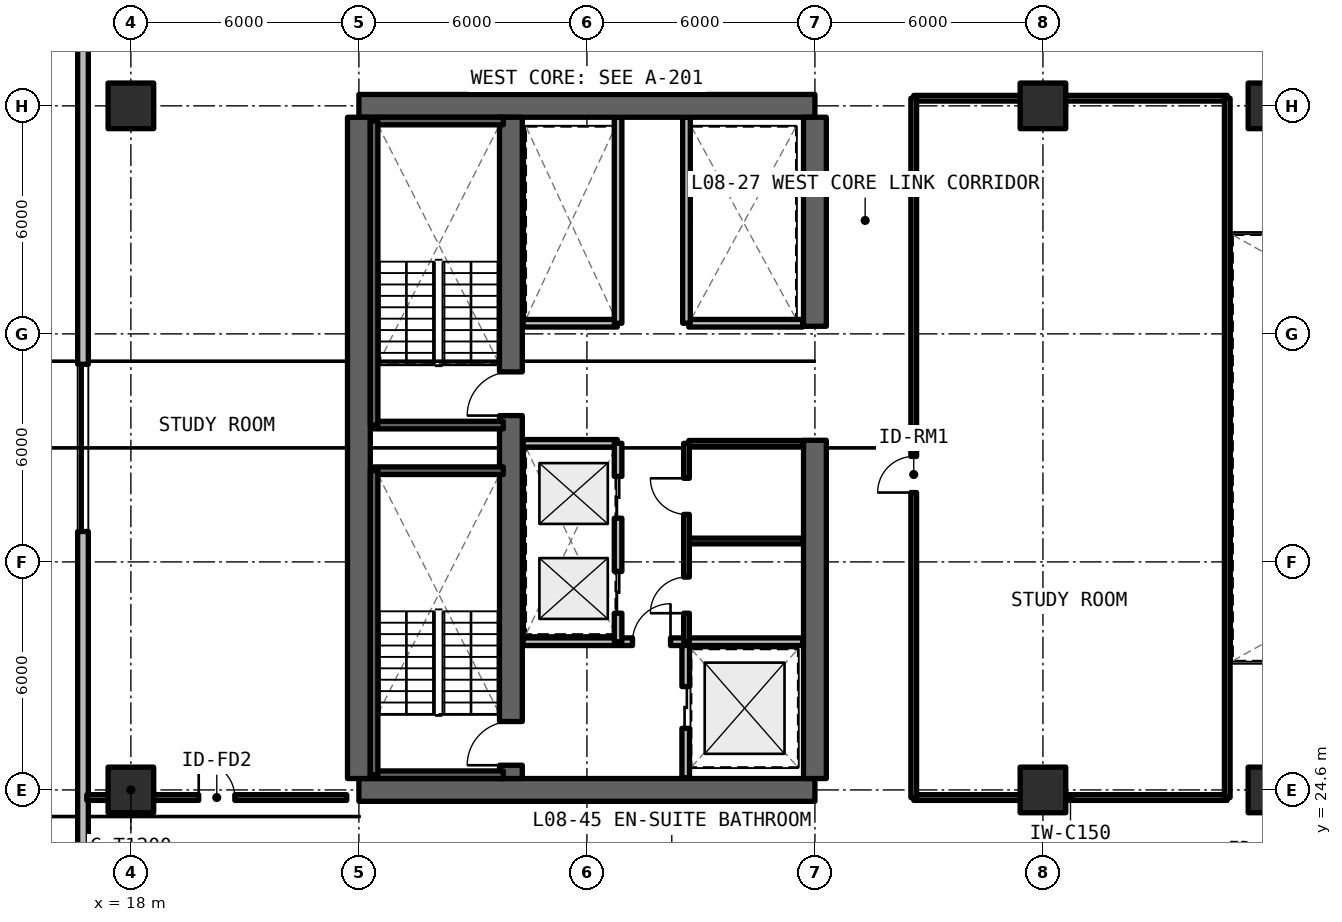
"""IFC4 building model, lengths in metres.
Left out: names, types, materials, properties, quantities, classifications, styles, units other than length and angle.
Written with IfcOpenShell. Run it as: python <this file> out.ifc"""

import sys

from ifc_helpers import new_model, si_unit, direction, frame, frame_2d, origin, origin_2d, place, context, subcontext, project, spatial, rectangle, extrude, element, fill, save


model = new_model("IFC4")
c1 = context("Model", 3, precision=1e-05, world=origin(), true_north=direction((0.0, 1.0)))
c2 = subcontext(c1, "Body", "Model", "MODEL_VIEW")
j1 = project(units=[si_unit("LENGTHUNIT", "METRE"), si_unit("PLANEANGLEUNIT", "RADIAN")], contexts=[c1])
p1 = place(None, origin())
s1 = spatial("IfcSite", under=j1, at=p1, CompositionType="ELEMENT")
p2 = place(p1, origin())
s2 = spatial("IfcBuilding", under=s1, at=p2, CompositionType="ELEMENT")
p3 = place(p2, frame((0.0, 0.0, 32.34)))
s3 = spatial("IfcBuildingStorey", under=s2, at=p3, CompositionType="ELEMENT", Elevation=32.34)
for number, where, z_axis, x_axis in (
    (1, (24.0, 24.6, 0.0), (0.0, 0.0, 1.0), (1.0, 0.0, 0.0)),
    (2, (36.0, 42.6, 0.0), (0.0, 0.0, 1.0), (-1.0, 0.0, 0.0)),
):
    element("IfcWall", number, at=place(p3, frame(where, z_axis=z_axis, x_axis=x_axis)), inside=s3, PredefinedType="SHEAR", context=c2, shape_type="SweptSolid", body=[
        extrude(rectangle(XDim=12.0, YDim=0.6, at=frame_2d((6.0, 0.0))), origin(), (0.0, 0.0, 1.0), 3.3),
    ])
p4 = place(p3, frame((24.0, 24.9, 0.0), z_axis=(0.0, 0.0, 1.0), x_axis=(0.0, 1.0, 0.0)))
e3 = element("IfcWall", 3, at=p4, inside=s3, PredefinedType="SHEAR", context=c2, shape_type="SweptSolid", body=[
    extrude(rectangle(XDim=17.4, YDim=0.6, at=frame_2d((8.7, 0.0))), origin(), (0.0, 0.0, 1.0), 3.3),
])
p5 = place(p3, frame((36.0, 24.9, 0.0), z_axis=(0.0, 0.0, 1.0), x_axis=(0.0, 1.0, 0.0)))
e4 = element("IfcWall", 4, at=p5, inside=s3, PredefinedType="SHEAR", context=c2, shape_type="SweptSolid", body=[
    extrude(rectangle(XDim=8.9, YDim=0.6, at=frame_2d((4.45, 0.0))), origin(), (0.0, 0.0, 1.0), 3.3),
])
p6 = place(p3, frame((36.0, 36.8, 0.0), z_axis=(0.0, 0.0, 1.0), x_axis=(0.0, 1.0, 0.0)))
e5 = element("IfcWall", 5, at=p6, inside=s3, PredefinedType="SHEAR", context=c2, shape_type="SweptSolid", body=[
    extrude(rectangle(XDim=5.5, YDim=0.6, at=frame_2d((2.75, 0.0))), origin(), (0.0, 0.0, 1.0), 3.3),
])
p7 = place(p3, frame((28.0, 24.9, 0.0), z_axis=(0.0, 0.0, 1.0), x_axis=(0.0, 1.0, 0.0)))
e6 = element("IfcWall", 6, at=p7, inside=s3, PredefinedType="SHEAR", context=c2, shape_type="SweptSolid", body=[
    extrude(rectangle(XDim=17.4, YDim=0.6, at=frame_2d((8.7, 0.0))), origin(), (0.0, 0.0, 1.0), 3.3),
])
p8 = place(p7, frame((0.35, 0.0, 0.0)))
e7 = element("IfcOpeningElement", 7, at=p8, cuts=e6, PredefinedType="OPENING", context=c2, shape_type="SweptSolid", body=[
    extrude(rectangle(XDim=1.15, YDim=2.15, at=frame_2d((0.575, 1.075))), frame((0.0, 0.31, 0.0), z_axis=(0.0, -1.0, 0.0), x_axis=(1.0, 0.0, 0.0)), (0.0, 0.0, 1.0), 0.62),
])
p9 = place(p7, frame((9.55, 0.0, 0.0)))
e8 = element("IfcOpeningElement", 8, at=p9, cuts=e6, PredefinedType="OPENING", context=c2, shape_type="SweptSolid", body=[
    extrude(rectangle(XDim=1.15, YDim=2.15, at=frame_2d((0.575, 1.075))), frame((0.0, 0.31, 0.0), z_axis=(0.0, -1.0, 0.0), x_axis=(1.0, 0.0, 0.0)), (0.0, 0.0, 1.0), 0.62),
])
for number, where, z_axis, x_axis in (
    (9, (18.0, 24.6, 0.0), (0.0, 0.0, 1.0), (1.0, 0.0, 0.0)),
    (10, (18.0, 42.6, 0.0), (0.0, 0.0, 1.0), (1.0, 0.0, 0.0)),
    (11, (42.0, 24.6, 0.0), (0.0, 0.0, 1.0), (1.0, 0.0, 0.0)),
    (12, (42.0, 42.6, 0.0), (0.0, 0.0, 1.0), (1.0, 0.0, 0.0)),
    (13, (48.0, 24.6, 0.0), (0.0, 0.0, 1.0), (1.0, 0.0, 0.0)),
    (14, (48.0, 42.6, 0.0), (0.0, 0.0, 1.0), (1.0, 0.0, 0.0)),
):
    element("IfcColumn", number, at=place(p3, frame(where, z_axis=z_axis, x_axis=x_axis)), inside=s3, PredefinedType="COLUMN", context=c2, shape_type="SweptSolid", body=[
        extrude(rectangle(XDim=1.2, YDim=1.2, at=origin_2d()), origin(), (0.0, 0.0, 1.0), 3.3),
    ])
p10 = place(p3, frame((16.74, 55.342, 0.0), z_axis=(0.0, 0.0, 1.0), x_axis=(0.0, -1.0, 0.0)))
e15 = element("IfcWall", 15, at=p10, inside=s3, PredefinedType="SOLIDWALL", context=c2, shape_type="SweptSolid", body=[
    extrude(rectangle(XDim=43.484, YDim=0.28, at=frame_2d((21.742, 0.0))), origin(), (0.0, 0.0, 1.0), 3.08),
])
p11 = place(p10, frame((38.942, 0.0, 0.0)))
e16 = element("IfcOpeningElement", 16, at=p11, cuts=e15, PredefinedType="OPENING", context=c2, shape_type="SweptSolid", body=[
    extrude(rectangle(XDim=1.1, YDim=2.15, at=frame_2d((0.55, 1.075))), frame((0.0, 0.15, 0.0), z_axis=(0.0, -1.0, 0.0), x_axis=(1.0, 0.0, 0.0)), (0.0, 0.0, 1.0), 0.3),
])
p12 = place(p10, frame((19.542, 0.0, 0.78)))
e17 = element("IfcOpeningElement", 17, at=p12, cuts=e15, PredefinedType="OPENING", context=c2, shape_type="SweptSolid", body=[
    extrude(rectangle(XDim=4.4, YDim=1.66, at=frame_2d((2.2, 0.83))), frame((0.0, 0.15, 0.0), z_axis=(0.0, -1.0, 0.0), x_axis=(1.0, 0.0, 0.0)), (0.0, 0.0, 1.0), 0.3),
])
p13 = place(p3, frame((32.6, 24.92, 0.0), z_axis=(0.0, 0.0, 1.0), x_axis=(0.0, 1.0, 0.0)))
e18 = element("IfcWall", 18, at=p13, inside=s3, PredefinedType="SOLIDWALL", context=c2, shape_type="SweptSolid", body=[
    extrude(rectangle(XDim=3.58, YDim=0.2, at=frame_2d((1.79, 0.0))), origin(), (0.0, 0.0, 1.0), 2.35),
])
p14 = place(p13, frame((1.3, 0.0, 0.0)))
e19 = element("IfcOpeningElement", 19, at=p14, cuts=e18, PredefinedType="OPENING", context=c2, shape_type="SweptSolid", body=[
    extrude(rectangle(XDim=1.1, YDim=2.2, at=frame_2d((0.55, 1.1))), frame((0.0, 0.11, 0.0), z_axis=(0.0, -1.0, 0.0), x_axis=(1.0, 0.0, 0.0)), (0.0, 0.0, 1.0), 0.22),
])
p15 = place(p3, frame((28.32, 28.5, 0.0), z_axis=(0.0, 0.0, 1.0), x_axis=(1.0, 0.0, 0.0)))
e20 = element("IfcWall", 20, at=p15, inside=s3, PredefinedType="SOLIDWALL", context=c2, shape_type="SweptSolid", body=[
    extrude(rectangle(XDim=7.36, YDim=0.2, at=frame_2d((3.68, 0.0))), origin(), (0.0, 0.0, 1.0), 2.35),
])
p16 = place(p15, frame((2.88, 0.0, 0.0)))
e21 = element("IfcOpeningElement", 21, at=p16, cuts=e20, PredefinedType="OPENING", context=c2, shape_type="SweptSolid", body=[
    extrude(rectangle(XDim=1.0, YDim=2.15, at=frame_2d((0.5, 1.075))), frame((0.0, 0.11, 0.0), z_axis=(0.0, -1.0, 0.0), x_axis=(1.0, 0.0, 0.0)), (0.0, 0.0, 1.0), 0.22),
])
p17 = place(p3, frame((28.32, 33.72, 0.0), z_axis=(0.0, 0.0, 1.0), x_axis=(1.0, 0.0, 0.0)))
e22 = element("IfcWall", 22, at=p17, inside=s3, PredefinedType="SOLIDWALL", context=c2, shape_type="SweptSolid", body=[
    extrude(rectangle(XDim=2.48, YDim=0.2, at=frame_2d((1.24, 0.0))), origin(), (0.0, 0.0, 1.0), 2.35),
])
p18 = place(p3, frame((30.82, 28.5, 0.0), z_axis=(0.0, 0.0, 1.0), x_axis=(0.0, 1.0, 0.0)))
e23 = element("IfcWall", 23, at=p18, inside=s3, PredefinedType="SOLIDWALL", context=c2, shape_type="SweptSolid", body=[
    extrude(rectangle(XDim=5.22, YDim=0.2, at=frame_2d((2.61, 0.0))), origin(), (0.0, 0.0, 1.0), 2.35),
])
p19 = place(p18, frame((0.75, 0.0, 0.0)))
e24 = element("IfcOpeningElement", 24, at=p19, cuts=e23, PredefinedType="OPENING", context=c2, shape_type="SweptSolid", body=[
    extrude(rectangle(XDim=1.1, YDim=2.2, at=frame_2d((0.55, 1.1))), frame((0.0, 0.11, 0.0), z_axis=(0.0, -1.0, 0.0), x_axis=(1.0, 0.0, 0.0)), (0.0, 0.0, 1.0), 0.22),
])
p20 = place(p18, frame((3.25, 0.0, 0.0)))
e25 = element("IfcOpeningElement", 25, at=p20, cuts=e23, PredefinedType="OPENING", context=c2, shape_type="SweptSolid", body=[
    extrude(rectangle(XDim=1.1, YDim=2.2, at=frame_2d((0.55, 1.1))), frame((0.0, 0.11, 0.0), z_axis=(0.0, -1.0, 0.0), x_axis=(1.0, 0.0, 0.0)), (0.0, 0.0, 1.0), 0.22),
])
for number, where, z_axis, x_axis in (
    (26, (32.68, 31.15, 0.0), (0.0, 0.0, 1.0), (1.0, 0.0, 0.0)),
    (27, (32.68, 33.72, 0.0), (0.0, 0.0, 1.0), (1.0, 0.0, 0.0)),
):
    element("IfcWall", number, at=place(p3, frame(where, z_axis=z_axis, x_axis=x_axis)), inside=s3, PredefinedType="SOLIDWALL", context=c2, shape_type="SweptSolid", body=[
        extrude(rectangle(XDim=3.0, YDim=0.15, at=frame_2d((1.5, 0.0))), origin(), (0.0, 0.0, 1.0), 2.35),
    ])
p21 = place(p3, frame((32.62, 28.5, 0.0), z_axis=(0.0, 0.0, 1.0), x_axis=(0.0, 1.0, 0.0)))
e28 = element("IfcWall", 28, at=p21, inside=s3, PredefinedType="SOLIDWALL", context=c2, shape_type="SweptSolid", body=[
    extrude(rectangle(XDim=5.22, YDim=0.15, at=frame_2d((2.61, 0.0))), origin(), (0.0, 0.0, 1.0), 2.35),
])
p22 = place(p21, frame((0.75, 0.0, 0.0)))
e29 = element("IfcOpeningElement", 29, at=p22, cuts=e28, PredefinedType="OPENING", context=c2, shape_type="SweptSolid", body=[
    extrude(rectangle(XDim=0.95, YDim=2.15, at=frame_2d((0.475, 1.075))), frame((0.0, 0.085, 0.0), z_axis=(0.0, -1.0, 0.0), x_axis=(1.0, 0.0, 0.0)), (0.0, 0.0, 1.0), 0.17),
])
p23 = place(p21, frame((3.35, 0.0, 0.0)))
e30 = element("IfcOpeningElement", 30, at=p23, cuts=e28, PredefinedType="OPENING", context=c2, shape_type="SweptSolid", body=[
    extrude(rectangle(XDim=0.95, YDim=2.15, at=frame_2d((0.475, 1.075))), frame((0.0, 0.085, 0.0), z_axis=(0.0, -1.0, 0.0), x_axis=(1.0, 0.0, 0.0)), (0.0, 0.0, 1.0), 0.17),
])
p24 = place(p3, frame((28.32, 36.88, 0.0), z_axis=(0.0, 0.0, 1.0), x_axis=(1.0, 0.0, 0.0)))
e31 = element("IfcWall", 31, at=p24, inside=s3, PredefinedType="SOLIDWALL", context=c2, shape_type="SweptSolid", body=[
    extrude(rectangle(XDim=2.48, YDim=0.2, at=frame_2d((1.24, 0.0))), origin(), (0.0, 0.0, 1.0), 2.35),
])
p25 = place(p3, frame((30.82, 36.88, 0.0), z_axis=(0.0, 0.0, 1.0), x_axis=(0.0, 1.0, 0.0)))
e32 = element("IfcWall", 32, at=p25, inside=s3, PredefinedType="SOLIDWALL", context=c2, shape_type="SweptSolid", body=[
    extrude(rectangle(XDim=5.42, YDim=0.2, at=frame_2d((2.71, 0.0))), origin(), (0.0, 0.0, 1.0), 2.35),
])
p26 = place(p3, frame((32.68, 36.88, 0.0), z_axis=(0.0, 0.0, 1.0), x_axis=(1.0, 0.0, 0.0)))
e33 = element("IfcWall", 33, at=p26, inside=s3, PredefinedType="SOLIDWALL", context=c2, shape_type="SweptSolid", body=[
    extrude(rectangle(XDim=3.0, YDim=0.2, at=frame_2d((1.5, 0.0))), origin(), (0.0, 0.0, 1.0), 2.35),
])
p27 = place(p3, frame((32.62, 36.88, 0.0), z_axis=(0.0, 0.0, 1.0), x_axis=(0.0, 1.0, 0.0)))
e34 = element("IfcWall", 34, at=p27, inside=s3, PredefinedType="SOLIDWALL", context=c2, shape_type="SweptSolid", body=[
    extrude(rectangle(XDim=5.42, YDim=0.2, at=frame_2d((2.71, 0.0))), origin(), (0.0, 0.0, 1.0), 2.35),
])
for number, where, z_axis, x_axis in (
    (35, (38.6, 24.4, 0.0), (0.0, 0.0, 1.0), (1.0, 0.0, 0.0)),
    (36, (38.6, 42.8, 0.0), (0.0, 0.0, 1.0), (1.0, 0.0, 0.0)),
):
    element("IfcWall", number, at=place(p3, frame(where, z_axis=z_axis, x_axis=x_axis)), inside=s3, PredefinedType="SOLIDWALL", context=c2, shape_type="SweptSolid", body=[
        extrude(rectangle(XDim=8.25, YDim=0.15, at=frame_2d((4.125, 0.0))), origin(), (0.0, 0.0, 1.0), 2.295),
    ])
p28 = place(p3, frame((38.6, 24.4, 0.0), z_axis=(0.0, 0.0, 1.0), x_axis=(0.0, 1.0, 0.0)))
e37 = element("IfcWall", 37, at=p28, inside=s3, PredefinedType="SOLIDWALL", context=c2, shape_type="SweptSolid", body=[
    extrude(rectangle(XDim=18.4, YDim=0.15, at=frame_2d((9.2, 0.0))), origin(), (0.0, 0.0, 1.0), 2.35),
])
p29 = place(p28, frame((8.025, 0.0, 0.0)))
e38 = element("IfcOpeningElement", 38, at=p29, cuts=e37, PredefinedType="OPENING", context=c2, shape_type="SweptSolid", body=[
    extrude(rectangle(XDim=0.95, YDim=2.15, at=frame_2d((0.475, 1.075))), frame((0.0, 0.085, 0.0), z_axis=(0.0, -1.0, 0.0), x_axis=(1.0, 0.0, 0.0)), (0.0, 0.0, 1.0), 0.17),
])
p30 = place(p3, frame((46.85, 24.4, 0.0), z_axis=(0.0, 0.0, 1.0), x_axis=(0.0, 1.0, 0.0)))
e39 = element("IfcWall", 39, at=p30, inside=s3, PredefinedType="SOLIDWALL", context=c2, shape_type="SweptSolid", body=[
    extrude(rectangle(XDim=18.4, YDim=0.15, at=frame_2d((9.2, 0.0))), origin(), (0.0, 0.0, 1.0), 2.35),
])
p31 = place(p3, frame((16.84, 24.4, 0.0), z_axis=(0.0, 0.0, 1.0), x_axis=(1.0, 0.0, 0.0)))
e40 = element("IfcWall", 40, at=p31, inside=s3, PredefinedType="SOLIDWALL", context=c2, shape_type="SweptSolid", body=[
    extrude(rectangle(XDim=6.84, YDim=0.15, at=frame_2d((3.42, 0.0))), origin(), (0.0, 0.0, 1.0), 2.295),
])
p32 = place(p31, frame((2.945, 0.0, 0.0)))
e41 = element("IfcOpeningElement", 41, at=p32, cuts=e40, PredefinedType="OPENING", context=c2, shape_type="SweptSolid", body=[
    extrude(rectangle(XDim=0.95, YDim=2.15, at=frame_2d((0.475, 1.075))), frame((0.0, 0.085, 0.0), z_axis=(0.0, -1.0, 0.0), x_axis=(1.0, 0.0, 0.0)), (0.0, 0.0, 1.0), 0.17),
])
for number, where, z_axis, x_axis in (
    (42, (24.4, 25.0, 0.0), (0.0, 0.0, 1.0), (1.0, 0.0, 0.0)),
    (43, (27.8, 33.0, 0.0), (0.0, 0.0, 1.0), (-1.0, 0.0, 0.0)),
):
    element("IfcWall", number, at=place(p3, frame(where, z_axis=z_axis, x_axis=x_axis)), inside=s3, PredefinedType="SOLIDWALL", context=c2, shape_type="SweptSolid", body=[
        extrude(rectangle(XDim=3.4, YDim=0.2, at=frame_2d((1.7, 0.0))), origin(), (0.0, 0.0, 1.0), 3.3),
    ])
p33 = place(p3, frame((24.4, 33.0, 0.0), z_axis=(0.0, 0.0, 1.0), x_axis=(0.0, -1.0, 0.0)))
e44 = element("IfcWall", 44, at=p33, inside=s3, PredefinedType="SOLIDWALL", context=c2, shape_type="SweptSolid", body=[
    extrude(rectangle(XDim=8.0, YDim=0.2, at=frame_2d((4.0, 0.0))), origin(), (0.0, 0.0, 1.0), 3.3),
])
for number, where, z_axis, x_axis in (
    (45, (24.4, 34.2, 0.0), (0.0, 0.0, 1.0), (1.0, 0.0, 0.0)),
    (46, (27.8, 42.2, 0.0), (0.0, 0.0, 1.0), (-1.0, 0.0, 0.0)),
):
    element("IfcWall", number, at=place(p3, frame(where, z_axis=z_axis, x_axis=x_axis)), inside=s3, PredefinedType="SOLIDWALL", context=c2, shape_type="SweptSolid", body=[
        extrude(rectangle(XDim=3.4, YDim=0.2, at=frame_2d((1.7, 0.0))), origin(), (0.0, 0.0, 1.0), 3.3),
    ])
p34 = place(p3, frame((24.4, 42.2, 0.0), z_axis=(0.0, 0.0, 1.0), x_axis=(0.0, -1.0, 0.0)))
e47 = element("IfcWall", 47, at=p34, inside=s3, PredefinedType="SOLIDWALL", context=c2, shape_type="SweptSolid", body=[
    extrude(rectangle(XDim=8.0, YDim=0.2, at=frame_2d((4.0, 0.0))), origin(), (0.0, 0.0, 1.0), 3.3),
])
p35 = place(p12, origin())
e48 = element("IfcWindow", 48, at=p35, inside=s3, PartitioningType="SINGLE_PANEL", PredefinedType="WINDOW", context=c2, shape_type="SweptSolid", body=[
    extrude(rectangle(XDim=4.4, YDim=1.66, at=frame_2d((2.2, 0.83))), frame((0.0, 0.03, 0.0), z_axis=(0.0, -1.0, 0.0), x_axis=(1.0, 0.0, 0.0)), (0.0, 0.0, 1.0), 0.06),
])
fill(e17, e48)
p36 = place(p14, origin())
e49 = element("IfcDoor", 49, at=p36, inside=s3, OperationType="SLIDING_TO_LEFT", PredefinedType="DOOR", context=c2, shape_type="SweptSolid", body=[
    extrude(rectangle(XDim=1.1, YDim=2.2, at=frame_2d((0.55, 1.1))), frame((0.0, 0.025, 0.0), z_axis=(0.0, -1.0, 0.0), x_axis=(1.0, 0.0, 0.0)), (0.0, 0.0, 1.0), 0.05),
])
fill(e19, e49)
p37 = place(p16, origin())
e50 = element("IfcDoor", 50, at=p37, inside=s3, OperationType="SINGLE_SWING_RIGHT", PredefinedType="DOOR", context=c2, shape_type="SweptSolid", body=[
    extrude(rectangle(XDim=1.0, YDim=2.15, at=frame_2d((0.5, 1.075))), frame((0.0, 0.025, 0.0), z_axis=(0.0, -1.0, 0.0), x_axis=(1.0, 0.0, 0.0)), (0.0, 0.0, 1.0), 0.05),
])
fill(e21, e50)
p38 = place(p19, origin())
e51 = element("IfcDoor", 51, at=p38, inside=s3, OperationType="SLIDING_TO_LEFT", PredefinedType="DOOR", context=c2, shape_type="SweptSolid", body=[
    extrude(rectangle(XDim=1.1, YDim=2.2, at=frame_2d((0.55, 1.1))), frame((0.0, 0.025, 0.0), z_axis=(0.0, -1.0, 0.0), x_axis=(1.0, 0.0, 0.0)), (0.0, 0.0, 1.0), 0.05),
])
fill(e24, e51)
p39 = place(p20, origin())
e52 = element("IfcDoor", 52, at=p39, inside=s3, OperationType="SLIDING_TO_RIGHT", PredefinedType="DOOR", context=c2, shape_type="SweptSolid", body=[
    extrude(rectangle(XDim=1.1, YDim=2.2, at=frame_2d((0.55, 1.1))), frame((0.0, 0.025, 0.0), z_axis=(0.0, -1.0, 0.0), x_axis=(1.0, 0.0, 0.0)), (0.0, 0.0, 1.0), 0.05),
])
fill(e25, e52)
p40 = place(p22, origin())
e53 = element("IfcDoor", 53, at=p40, inside=s3, OperationType="SINGLE_SWING_LEFT", PredefinedType="DOOR", context=c2, shape_type="SweptSolid", body=[
    extrude(rectangle(XDim=0.95, YDim=2.15, at=frame_2d((0.475, 1.075))), frame((0.0, 0.025, 0.0), z_axis=(0.0, -1.0, 0.0), x_axis=(1.0, 0.0, 0.0)), (0.0, 0.0, 1.0), 0.05),
])
fill(e29, e53)
p41 = place(p23, origin())
e54 = element("IfcDoor", 54, at=p41, inside=s3, OperationType="SINGLE_SWING_RIGHT", PredefinedType="DOOR", context=c2, shape_type="SweptSolid", body=[
    extrude(rectangle(XDim=0.95, YDim=2.15, at=frame_2d((0.475, 1.075))), frame((0.0, 0.025, 0.0), z_axis=(0.0, -1.0, 0.0), x_axis=(1.0, 0.0, 0.0)), (0.0, 0.0, 1.0), 0.05),
])
fill(e30, e54)
p42 = place(p29, origin())
e55 = element("IfcDoor", 55, at=p42, inside=s3, OperationType="SINGLE_SWING_LEFT", PredefinedType="DOOR", context=c2, shape_type="SweptSolid", body=[
    extrude(rectangle(XDim=0.95, YDim=2.15, at=frame_2d((0.475, 1.075))), frame((0.0, 0.025, 0.0), z_axis=(0.0, -1.0, 0.0), x_axis=(1.0, 0.0, 0.0)), (0.0, 0.0, 1.0), 0.05),
])
fill(e38, e55)
p43 = place(p32, origin())
e56 = element("IfcDoor", 56, at=p43, inside=s3, OperationType="SINGLE_SWING_LEFT", PredefinedType="DOOR", context=c2, shape_type="SweptSolid", body=[
    extrude(rectangle(XDim=0.95, YDim=2.15, at=frame_2d((0.475, 1.075))), frame((0.0, 0.025, 0.0), z_axis=(0.0, -1.0, 0.0), x_axis=(1.0, 0.0, 0.0)), (0.0, 0.0, 1.0), 0.05),
])
fill(e41, e56)
p44 = place(p8, origin())
e57 = element("IfcDoor", 57, at=p44, inside=s3, OperationType="SINGLE_SWING_RIGHT", PredefinedType="DOOR", context=c2, shape_type="SweptSolid", body=[
    extrude(rectangle(XDim=1.15, YDim=2.15, at=frame_2d((0.575, 1.075))), frame((0.0, 0.025, 0.0), z_axis=(0.0, -1.0, 0.0), x_axis=(1.0, 0.0, 0.0)), (0.0, 0.0, 1.0), 0.05),
])
fill(e7, e57)
p45 = place(p9, origin())
e58 = element("IfcDoor", 58, at=p45, inside=s3, OperationType="SINGLE_SWING_LEFT", PredefinedType="DOOR", context=c2, shape_type="SweptSolid", body=[
    extrude(rectangle(XDim=1.15, YDim=2.15, at=frame_2d((0.575, 1.075))), frame((0.0, 0.025, 0.0), z_axis=(0.0, -1.0, 0.0), x_axis=(1.0, 0.0, 0.0)), (0.0, 0.0, 1.0), 0.05),
])
fill(e8, e58)
save(model, sys.argv[1])
